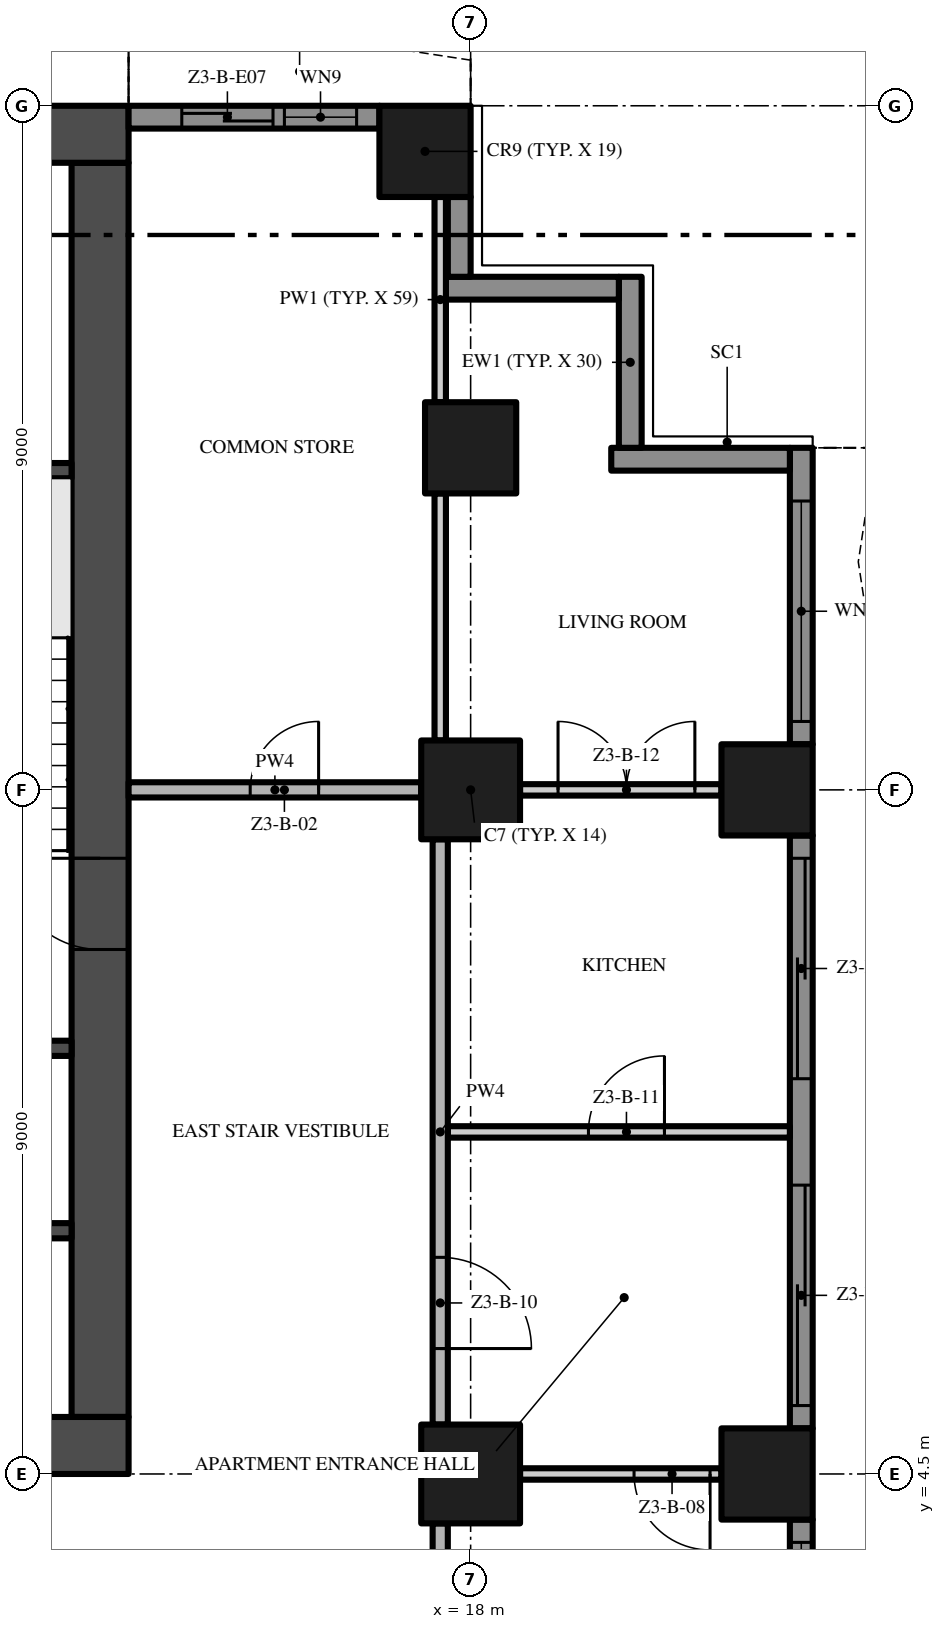
"""IFC4 building model, lengths in metres.
Left out: names, types, materials, properties, quantities, classifications, styles, units other than length and angle.
Written with IfcOpenShell. Run it as: python <this file> out.ifc"""

import sys

from ifc_helpers import new_model, si_unit, direction, frame, frame_2d, origin, origin_2d, place, context, subcontext, project, spatial, polyline, rectangle, outline, extrude, element, fill, save


model = new_model("IFC4")
c1 = context("Model", 3, precision=1e-05, world=origin(), true_north=direction((0.0, 1.0)))
c2 = subcontext(c1, "Body", "Model", "MODEL_VIEW")
j1 = project(units=[si_unit("LENGTHUNIT", "METRE"), si_unit("PLANEANGLEUNIT", "RADIAN")], contexts=[c1])
p1 = place(None, origin())
s1 = spatial("IfcSite", under=j1, at=p1, CompositionType="ELEMENT")
p2 = place(p1, origin())
s2 = spatial("IfcBuilding", under=s1, at=p2, CompositionType="ELEMENT")
p3 = place(p2, frame((0.0, 0.0, 136.4)))
s3 = spatial("IfcBuildingStorey", under=s2, at=p3, CompositionType="ELEMENT", Elevation=136.4)
p4 = place(p3, frame((-13.5, 4.875, -0.3), z_axis=(0.0, 0.0, 1.0), x_axis=(1.0, 0.0, 0.0)))
e1 = element("IfcWall", 1, at=p4, inside=s3, PredefinedType="SHEAR", context=c2, shape_type="SweptSolid", body=[
    extrude(rectangle(XDim=27.0, YDim=0.75, at=frame_2d((13.5, 0.0))), origin(), (0.0, 0.0, 1.0), 3.8),
])
p5 = place(p4, frame((12.0, 0.0, 0.3)))
e2 = element("IfcOpeningElement", 2, at=p5, cuts=e1, PredefinedType="OPENING", context=c2, shape_type="SweptSolid", body=[
    extrude(rectangle(XDim=3.0, YDim=2.4, at=frame_2d((1.5, 1.2))), frame((0.0, 0.385, 0.0), z_axis=(0.0, -1.0, 0.0), x_axis=(1.0, 0.0, 0.0)), (0.0, 0.0, 1.0), 0.77),
])
p6 = place(p4, frame((4.9, 0.0, 0.3)))
e3 = element("IfcOpeningElement", 3, at=p6, cuts=e1, PredefinedType="OPENING", context=c2, shape_type="SweptSolid", body=[
    extrude(rectangle(XDim=1.2, YDim=2.2, at=frame_2d((0.6, 1.1))), frame((0.0, 0.385, 0.0), z_axis=(0.0, -1.0, 0.0), x_axis=(1.0, 0.0, 0.0)), (0.0, 0.0, 1.0), 0.77),
])
p7 = place(p4, frame((20.75, 0.0, 0.3)))
e4 = element("IfcOpeningElement", 4, at=p7, cuts=e1, PredefinedType="OPENING", context=c2, shape_type="SweptSolid", body=[
    extrude(rectangle(XDim=1.5, YDim=2.2, at=frame_2d((0.75, 1.1))), frame((0.0, 0.385, 0.0), z_axis=(0.0, -1.0, 0.0), x_axis=(1.0, 0.0, 0.0)), (0.0, 0.0, 1.0), 0.77),
])
p8 = place(p4, frame((17.4, 0.0, 0.3)))
e5 = element("IfcOpeningElement", 5, at=p8, cuts=e1, PredefinedType="OPENING", context=c2, shape_type="SweptSolid", body=[
    extrude(rectangle(XDim=1.2, YDim=2.2, at=frame_2d((0.6, 1.1))), frame((0.0, 0.385, 0.0), z_axis=(0.0, -1.0, 0.0), x_axis=(1.0, 0.0, 0.0)), (0.0, 0.0, 1.0), 0.77),
])
p9 = place(p3, frame((13.125, 5.25, -0.3), z_axis=(0.0, 0.0, 1.0), x_axis=(0.0, 1.0, 0.0)))
e6 = element("IfcWall", 6, at=p9, inside=s3, PredefinedType="SHEAR", context=c2, shape_type="SweptSolid", body=[
    extrude(rectangle(XDim=16.5, YDim=0.75, at=frame_2d((8.25, 0.0))), origin(), (0.0, 0.0, 1.0), 3.8),
])
p10 = place(p9, frame((6.15, 0.0, 0.3)))
e7 = element("IfcOpeningElement", 7, at=p10, cuts=e6, PredefinedType="OPENING", context=c2, shape_type="SweptSolid", body=[
    extrude(rectangle(XDim=1.2, YDim=2.2, at=frame_2d((0.6, 1.1))), frame((0.0, 0.385, 0.0), z_axis=(0.0, -1.0, 0.0), x_axis=(1.0, 0.0, 0.0)), (0.0, 0.0, 1.0), 0.77),
])
p11 = place(p3, frame((13.5, 22.125, -0.3), z_axis=(0.0, 0.0, 1.0), x_axis=(-1.0, 0.0, 0.0)))
e8 = element("IfcWall", 8, at=p11, inside=s3, PredefinedType="SHEAR", context=c2, shape_type="SweptSolid", body=[
    extrude(rectangle(XDim=27.0, YDim=0.75, at=frame_2d((13.5, 0.0))), origin(), (0.0, 0.0, 1.0), 3.8),
])
p12 = place(p3, frame((18.0, 13.5, 0.0), z_axis=(0.0, 0.0, 1.0), x_axis=(1.0, 0.0, 0.0)))
e9 = element("IfcColumn", 9, at=p12, inside=s3, PredefinedType="COLUMN", context=c2, shape_type="SweptSolid", body=[
    extrude(rectangle(XDim=1.3, YDim=1.3, at=origin_2d()), origin(), (0.0, 0.0, 1.0), 3.5),
])
p13 = place(p3, frame((17.4, 21.9, 0.0), z_axis=(0.0, 0.0, 1.0), x_axis=(1.0, 0.0, 0.0)))
e10 = element("IfcColumn", 10, at=p13, inside=s3, PredefinedType="COLUMN", context=c2, shape_type="SweptSolid", body=[
    extrude(rectangle(XDim=1.2, YDim=1.2, at=origin_2d()), origin(), (0.0, 0.0, 1.0), 3.5),
])
p14 = place(p3, frame((18.0, 4.5, 0.0), z_axis=(0.0, 0.0, 1.0), x_axis=(1.0, 0.0, 0.0)))
e11 = element("IfcColumn", 11, at=p14, inside=s3, PredefinedType="COLUMN", context=c2, shape_type="SweptSolid", body=[
    extrude(rectangle(XDim=1.3, YDim=1.3, at=origin_2d()), origin(), (0.0, 0.0, 1.0), 3.5),
])
for number, where, z_axis, x_axis in (
    (12, (21.9, 13.5, 0.0), (0.0, 0.0, 1.0), (1.0, 0.0, 0.0)),
    (13, (18.0, 18.0, 0.0), (0.0, 0.0, 1.0), (1.0, 0.0, 0.0)),
    (14, (21.9, 4.5, 0.0), (0.0, 0.0, 1.0), (1.0, 0.0, 0.0)),
):
    element("IfcColumn", number, at=place(p3, frame(where, z_axis=z_axis, x_axis=x_axis)), inside=s3, PredefinedType="COLUMN", context=c2, shape_type="SweptSolid", body=[
        extrude(rectangle(XDim=1.2, YDim=1.2, at=origin_2d()), origin(), (0.0, 0.0, 1.0), 3.5),
    ])
p15 = place(p3, frame((22.35, 3.9, 0.0), z_axis=(0.0, 0.0, 1.0), x_axis=(0.0, -1.0, 0.0)))
e15 = element("IfcWall", 15, at=p15, inside=s3, PredefinedType="SOLIDWALL", context=c2, shape_type="SweptSolid", body=[
    extrude(rectangle(XDim=7.8, YDim=0.3, at=frame_2d((3.9, 0.0))), origin(), (0.0, 0.0, 1.0), 3.5),
])
p16 = place(p15, frame((4.6, 0.0, 0.45)))
e16 = element("IfcOpeningElement", 16, at=p16, cuts=e15, PredefinedType="OPENING", context=c2, shape_type="SweptSolid", body=[
    extrude(rectangle(XDim=2.9, YDim=2.65, at=frame_2d((1.45, 1.325))), frame((0.0, 0.16, 0.0), z_axis=(0.0, -1.0, 0.0), x_axis=(1.0, 0.0, 0.0)), (0.0, 0.0, 1.0), 0.32),
])
p17 = place(p15, frame((0.3, 0.0, 0.45)))
e17 = element("IfcOpeningElement", 17, at=p17, cuts=e15, PredefinedType="OPENING", context=c2, shape_type="SweptSolid", body=[
    extrude(rectangle(XDim=2.9, YDim=2.65, at=frame_2d((1.45, 1.325))), frame((0.0, 0.16, 0.0), z_axis=(0.0, -1.0, 0.0), x_axis=(1.0, 0.0, 0.0)), (0.0, 0.0, 1.0), 0.32),
])
p18 = place(p3, frame((22.35, 12.9, 0.0), z_axis=(0.0, 0.0, 1.0), x_axis=(0.0, -1.0, 0.0)))
e18 = element("IfcWall", 18, at=p18, inside=s3, PredefinedType="SOLIDWALL", context=c2, shape_type="SweptSolid", body=[
    extrude(rectangle(XDim=7.8, YDim=0.3, at=frame_2d((3.9, 0.0))), origin(), (0.0, 0.0, 1.0), 3.5),
])
p19 = place(p18, frame((4.6, 0.0, 0.0)))
e19 = element("IfcOpeningElement", 19, at=p19, cuts=e18, PredefinedType="OPENING", context=c2, shape_type="SweptSolid", body=[
    extrude(rectangle(XDim=2.9, YDim=2.4, at=frame_2d((1.45, 1.2))), frame((0.0, 0.16, 0.0), z_axis=(0.0, -1.0, 0.0), x_axis=(1.0, 0.0, 0.0)), (0.0, 0.0, 1.0), 0.32),
])
p20 = place(p18, frame((0.3, 0.0, 0.0)))
e20 = element("IfcOpeningElement", 20, at=p20, cuts=e18, PredefinedType="OPENING", context=c2, shape_type="SweptSolid", body=[
    extrude(rectangle(XDim=2.9, YDim=2.4, at=frame_2d((1.45, 1.2))), frame((0.0, 0.16, 0.0), z_axis=(0.0, -1.0, 0.0), x_axis=(1.0, 0.0, 0.0)), (0.0, 0.0, 1.0), 0.32),
])
p21 = place(p3, frame((22.35, 18.0, 0.0), z_axis=(0.0, 0.0, 1.0), x_axis=(0.0, -1.0, 0.0)))
e21 = element("IfcWall", 21, at=p21, inside=s3, PredefinedType="SOLIDWALL", context=c2, shape_type="SweptSolid", body=[
    extrude(rectangle(XDim=3.9, YDim=0.3, at=frame_2d((1.95, 0.0))), origin(), (0.0, 0.0, 1.0), 3.5),
])
p22 = place(p21, frame((0.7, 0.0, 0.45)))
e22 = element("IfcOpeningElement", 22, at=p22, cuts=e21, PredefinedType="OPENING", context=c2, shape_type="SweptSolid", body=[
    extrude(rectangle(XDim=2.9, YDim=2.65, at=frame_2d((1.45, 1.325))), frame((0.0, 0.16, 0.0), z_axis=(0.0, -1.0, 0.0), x_axis=(1.0, 0.0, 0.0)), (0.0, 0.0, 1.0), 0.32),
])
p23 = place(p3, frame((19.85, 17.85, 0.0), z_axis=(0.0, 0.0, 1.0), x_axis=(1.0, 0.0, 0.0)))
e23 = element("IfcWall", 23, at=p23, inside=s3, PredefinedType="SOLIDWALL", context=c2, shape_type="SweptSolid", body=[
    extrude(rectangle(XDim=2.35, YDim=0.3, at=frame_2d((1.175, 0.0))), origin(), (0.0, 0.0, 1.0), 3.5),
])
p24 = place(p3, frame((20.1, 20.25, 0.0), z_axis=(0.0, 0.0, 1.0), x_axis=(0.0, -1.0, 0.0)))
e24 = element("IfcWall", 24, at=p24, inside=s3, PredefinedType="SOLIDWALL", context=c2, shape_type="SweptSolid", body=[
    extrude(rectangle(XDim=2.25, YDim=0.3, at=frame_2d((1.125, 0.0))), origin(), (0.0, 0.0, 1.0), 3.5),
])
p25 = place(p3, frame((17.6, 20.1, 0.0), z_axis=(0.0, 0.0, 1.0), x_axis=(1.0, 0.0, 0.0)))
e25 = element("IfcWall", 25, at=p25, inside=s3, PredefinedType="SOLIDWALL", context=c2, shape_type="SweptSolid", body=[
    extrude(rectangle(XDim=2.35, YDim=0.3, at=frame_2d((1.175, 0.0))), origin(), (0.0, 0.0, 1.0), 3.5),
])
p26 = place(p3, frame((17.85, 21.3, 0.0), z_axis=(0.0, 0.0, 1.0), x_axis=(0.0, -1.0, 0.0)))
e26 = element("IfcWall", 26, at=p26, inside=s3, PredefinedType="SOLIDWALL", context=c2, shape_type="SweptSolid", body=[
    extrude(rectangle(XDim=1.05, YDim=0.3, at=frame_2d((0.525, 0.0))), origin(), (0.0, 0.0, 1.0), 3.5),
])
p27 = place(p3, frame((13.5, 22.35, 0.0), z_axis=(0.0, 0.0, 1.0), x_axis=(1.0, 0.0, 0.0)))
e27 = element("IfcWall", 27, at=p27, inside=s3, PredefinedType="SOLIDWALL", context=c2, shape_type="SweptSolid", body=[
    extrude(rectangle(XDim=3.3, YDim=0.3, at=frame_2d((1.65, 0.0))), origin(), (0.0, 0.0, 1.0), 3.5),
])
p28 = place(p27, frame((2.05, 0.0, 0.45)))
e28 = element("IfcOpeningElement", 28, at=p28, cuts=e27, PredefinedType="OPENING", context=c2, shape_type="SweptSolid", body=[
    extrude(rectangle(XDim=0.95, YDim=2.65, at=frame_2d((0.475, 1.325))), frame((0.0, 0.16, 0.0), z_axis=(0.0, -1.0, 0.0), x_axis=(1.0, 0.0, 0.0)), (0.0, 0.0, 1.0), 0.32),
])
p29 = place(p27, frame((0.7, 0.0, 0.0)))
e29 = element("IfcOpeningElement", 29, at=p29, cuts=e27, PredefinedType="OPENING", context=c2, shape_type="SweptSolid", body=[
    extrude(rectangle(XDim=1.2, YDim=2.4, at=frame_2d((0.6, 1.2))), frame((0.0, 0.16, 0.0), z_axis=(0.0, -1.0, 0.0), x_axis=(1.0, 0.0, 0.0)), (0.0, 0.0, 1.0), 0.32),
])
p30 = place(p3, origin())
e30 = element("IfcWall", 30, at=p30, inside=s3, PredefinedType="USERDEFINED", context=c2, shape_type="SweptSolid", body=[
    extrude(outline(polyline([(23.1, -13.5), (23.329, -12.0), (23.929, -10.5), (24.671, -9.0), (25.271, -7.5), (25.5, -6.0), (25.271, -4.5), (24.671, -3.0), (23.929, -1.5), (23.329, 0.0), (23.1, 1.5), (23.329, 3.0), (23.929, 4.5), (24.671, 6.0), (25.271, 7.5), (25.5, 9.0), (25.271, 10.5), (24.671, 12.0), (23.929, 13.5), (23.329, 15.0), (23.1, 16.5), (23.329, 18.0), (23.082, 18.038), (22.847, 16.5), (23.086, 14.934), (23.701, 13.398), (24.442, 11.898), (25.028, 10.434), (25.247, 9.0), (25.028, 7.566), (24.442, 6.102), (23.701, 4.602), (23.086, 3.066), (22.847, 1.5), (23.086, -0.066), (23.701, -1.602), (24.442, -3.102), (25.028, -4.566), (25.247, -6.0), (25.028, -7.434), (24.442, -8.898), (23.701, -10.398), (23.086, -11.934), (22.853, -13.462), (23.1, -13.5)])), origin(), (0.0, 0.0, 1.0), 0.9),
])
p31 = place(p3, origin())
e31 = element("IfcWall", 31, at=p31, inside=s3, PredefinedType="USERDEFINED", context=c2, shape_type="SweptSolid", body=[
    extrude(outline(polyline([(18.0, 23.1), (16.5, 23.329), (15.0, 23.929), (13.5, 24.671), (13.389, 24.447), (14.898, 23.701), (16.434, 23.086), (17.962, 22.853), (18.0, 23.1)])), origin(), (0.0, 0.0, 1.0), 0.9),
])
for number, where, z_axis, x_axis in (
    (32, (9.65, 7.7, 0.0), (0.0, 0.0, 1.0), (1.0, 0.0, 0.0)),
    (33, (9.65, 10.1, 0.0), (0.0, 0.0, 1.0), (1.0, 0.0, 0.0)),
    (34, (9.65, 17.7, 0.0), (0.0, 0.0, 1.0), (1.0, 0.0, 0.0)),
):
    element("IfcWall", number, at=place(p3, frame(where, z_axis=z_axis, x_axis=x_axis)), inside=s3, PredefinedType="SHEAR", context=c2, shape_type="SweptSolid", body=[
        extrude(rectangle(XDim=3.1, YDim=0.2, at=frame_2d((1.55, 0.0))), origin(), (0.0, 0.0, 1.0), 3.5),
    ])
p32 = place(p3, frame((21.3, 4.5, 0.0), z_axis=(0.0, 0.0, 1.0), x_axis=(-1.0, 0.0, 0.0)))
e35 = element("IfcWall", 35, at=p32, inside=s3, PredefinedType="PARTITIONING", context=c2, shape_type="SweptSolid", body=[
    extrude(rectangle(XDim=2.65, YDim=0.15, at=frame_2d((1.325, 0.0))), origin(), (0.0, 0.0, 1.0), 3.5),
])
p33 = place(p32, frame((0.15, 0.0, 0.0)))
e36 = element("IfcOpeningElement", 36, at=p33, cuts=e35, PredefinedType="OPENING", context=c2, shape_type="SweptSolid", body=[
    extrude(rectangle(XDim=1.0, YDim=2.4, at=frame_2d((0.5, 1.2))), frame((0.0, 0.085, 0.0), z_axis=(0.0, -1.0, 0.0), x_axis=(1.0, 0.0, 0.0)), (0.0, 0.0, 1.0), 0.17),
])
p34 = place(p3, frame((17.7, 9.0, 0.0), z_axis=(0.0, 0.0, 1.0), x_axis=(1.0, 0.0, 0.0)))
e37 = element("IfcWall", 37, at=p34, inside=s3, PredefinedType="PARTITIONING", context=c2, shape_type="SweptSolid", body=[
    extrude(rectangle(XDim=4.5, YDim=0.15, at=frame_2d((2.25, 0.0))), origin(), (0.0, 0.0, 1.0), 3.5),
])
p35 = place(p34, frame((1.85, 0.0, 0.0)))
e38 = element("IfcOpeningElement", 38, at=p35, cuts=e37, PredefinedType="OPENING", context=c2, shape_type="SweptSolid", body=[
    extrude(rectangle(XDim=1.0, YDim=2.4, at=frame_2d((0.5, 1.2))), frame((0.0, 0.085, 0.0), z_axis=(0.0, -1.0, 0.0), x_axis=(1.0, 0.0, 0.0)), (0.0, 0.0, 1.0), 0.17),
])
p36 = place(p3, frame((13.5, 13.5, 0.0), z_axis=(0.0, 0.0, 1.0), x_axis=(1.0, 0.0, 0.0)))
e39 = element("IfcWall", 39, at=p36, inside=s3, PredefinedType="PARTITIONING", context=c2, shape_type="SweptSolid", body=[
    extrude(rectangle(XDim=3.85, YDim=0.2, at=frame_2d((1.925, 0.0))), origin(), (0.0, 0.0, 1.0), 3.5),
])
p37 = place(p36, frame((1.6, 0.0, 0.0)))
e40 = element("IfcOpeningElement", 40, at=p37, cuts=e39, PredefinedType="OPENING", context=c2, shape_type="SweptSolid", body=[
    extrude(rectangle(XDim=0.9, YDim=2.1, at=frame_2d((0.45, 1.05))), frame((0.0, 0.11, 0.0), z_axis=(0.0, -1.0, 0.0), x_axis=(1.0, 0.0, 0.0)), (0.0, 0.0, 1.0), 0.22),
])
p38 = place(p3, frame((18.65, 13.5, 0.0), z_axis=(0.0, 0.0, 1.0), x_axis=(1.0, 0.0, 0.0)))
e41 = element("IfcWall", 41, at=p38, inside=s3, PredefinedType="PARTITIONING", context=c2, shape_type="SweptSolid", body=[
    extrude(rectangle(XDim=2.65, YDim=0.15, at=frame_2d((1.325, 0.0))), origin(), (0.0, 0.0, 1.0), 3.5),
])
p39 = place(p38, frame((0.5, 0.0, 0.0)))
e42 = element("IfcOpeningElement", 42, at=p39, cuts=e41, PredefinedType="OPENING", context=c2, shape_type="SweptSolid", body=[
    extrude(rectangle(XDim=1.8, YDim=2.4, at=frame_2d((0.9, 1.2))), frame((0.0, 0.085, 0.0), z_axis=(0.0, -1.0, 0.0), x_axis=(1.0, 0.0, 0.0)), (0.0, 0.0, 1.0), 0.17),
])
p40 = place(p3, frame((17.6, -0.2, 0.0), z_axis=(0.0, 0.0, 1.0), x_axis=(0.0, 1.0, 0.0)))
e43 = element("IfcWall", 43, at=p40, inside=s3, PredefinedType="PARTITIONING", context=c2, shape_type="SweptSolid", body=[
    extrude(rectangle(XDim=4.05, YDim=0.2, at=frame_2d((2.025, 0.0))), origin(), (0.0, 0.0, 1.0), 3.5),
])
p41 = place(p3, frame((17.6, 12.85, 0.0), z_axis=(0.0, 0.0, 1.0), x_axis=(0.0, -1.0, 0.0)))
e44 = element("IfcWall", 44, at=p41, inside=s3, PredefinedType="PARTITIONING", context=c2, shape_type="SweptSolid", body=[
    extrude(rectangle(XDim=7.7, YDim=0.2, at=frame_2d((3.85, 0.0))), origin(), (0.0, 0.0, 1.0), 3.5),
])
p42 = place(p41, frame((5.5, 0.0, 0.0)))
e45 = element("IfcOpeningElement", 45, at=p42, cuts=e44, PredefinedType="OPENING", context=c2, shape_type="SweptSolid", body=[
    extrude(rectangle(XDim=1.2, YDim=2.4, at=frame_2d((0.6, 1.2))), frame((0.0, 0.11, 0.0), z_axis=(0.0, -1.0, 0.0), x_axis=(1.0, 0.0, 0.0)), (0.0, 0.0, 1.0), 0.22),
])
p43 = place(p3, frame((17.6, 14.15, 0.0), z_axis=(0.0, 0.0, 1.0), x_axis=(0.0, 1.0, 0.0)))
e46 = element("IfcWall", 46, at=p43, inside=s3, PredefinedType="PARTITIONING", context=c2, shape_type="SweptSolid", body=[
    extrude(rectangle(XDim=3.25, YDim=0.15, at=frame_2d((1.625, 0.0))), origin(), (0.0, 0.0, 1.0), 3.5),
])
p44 = place(p3, frame((17.6, 18.6, 0.0), z_axis=(0.0, 0.0, 1.0), x_axis=(0.0, 1.0, 0.0)))
e47 = element("IfcWall", 47, at=p44, inside=s3, PredefinedType="PARTITIONING", context=c2, shape_type="SweptSolid", body=[
    extrude(rectangle(XDim=2.7, YDim=0.15, at=frame_2d((1.35, 0.0))), origin(), (0.0, 0.0, 1.0), 3.5),
])
p45 = place(p17, origin())
e48 = element("IfcWindow", 48, at=p45, inside=s3, PartitioningType="SINGLE_PANEL", PredefinedType="WINDOW", context=c2, shape_type="SweptSolid", body=[
    extrude(rectangle(XDim=2.9, YDim=2.65, at=frame_2d((1.45, 1.325))), frame((0.0, 0.03, 0.0), z_axis=(0.0, -1.0, 0.0), x_axis=(1.0, 0.0, 0.0)), (0.0, 0.0, 1.0), 0.06),
])
fill(e17, e48)
p46 = place(p19, origin())
e49 = element("IfcDoor", 49, at=p46, inside=s3, OperationType="SINGLE_SWING_LEFT", PredefinedType="DOOR", context=c2, shape_type="SweptSolid", body=[
    extrude(rectangle(XDim=2.9, YDim=2.4, at=frame_2d((1.45, 1.2))), frame((0.0, 0.025, 0.0), z_axis=(0.0, -1.0, 0.0), x_axis=(1.0, 0.0, 0.0)), (0.0, 0.0, 1.0), 0.05),
])
fill(e19, e49)
p47 = place(p20, origin())
e50 = element("IfcDoor", 50, at=p47, inside=s3, OperationType="SINGLE_SWING_LEFT", PredefinedType="DOOR", context=c2, shape_type="SweptSolid", body=[
    extrude(rectangle(XDim=2.9, YDim=2.4, at=frame_2d((1.45, 1.2))), frame((0.0, 0.025, 0.0), z_axis=(0.0, -1.0, 0.0), x_axis=(1.0, 0.0, 0.0)), (0.0, 0.0, 1.0), 0.05),
])
fill(e20, e50)
p48 = place(p22, origin())
e51 = element("IfcWindow", 51, at=p48, inside=s3, PartitioningType="SINGLE_PANEL", PredefinedType="WINDOW", context=c2, shape_type="SweptSolid", body=[
    extrude(rectangle(XDim=2.9, YDim=2.65, at=frame_2d((1.45, 1.325))), frame((0.0, 0.03, 0.0), z_axis=(0.0, -1.0, 0.0), x_axis=(1.0, 0.0, 0.0)), (0.0, 0.0, 1.0), 0.06),
])
fill(e22, e51)
p49 = place(p28, origin())
e52 = element("IfcWindow", 52, at=p49, inside=s3, PartitioningType="SINGLE_PANEL", PredefinedType="WINDOW", context=c2, shape_type="SweptSolid", body=[
    extrude(rectangle(XDim=0.95, YDim=2.65, at=frame_2d((0.475, 1.325))), frame((0.0, 0.03, 0.0), z_axis=(0.0, -1.0, 0.0), x_axis=(1.0, 0.0, 0.0)), (0.0, 0.0, 1.0), 0.06),
])
fill(e28, e52)
p50 = place(p29, origin())
e53 = element("IfcDoor", 53, at=p50, inside=s3, OperationType="SINGLE_SWING_LEFT", PredefinedType="DOOR", context=c2, shape_type="SweptSolid", body=[
    extrude(rectangle(XDim=1.2, YDim=2.4, at=frame_2d((0.6, 1.2))), frame((0.0, 0.025, 0.0), z_axis=(0.0, -1.0, 0.0), x_axis=(1.0, 0.0, 0.0)), (0.0, 0.0, 1.0), 0.05),
])
fill(e29, e53)
p51 = place(p10, frame((1.2, 0.0, 0.0), z_axis=(0.0, 0.0, 1.0), x_axis=(-1.0, 0.0, 0.0)))
e54 = element("IfcDoor", 54, at=p51, inside=s3, OperationType="SINGLE_SWING_LEFT", PredefinedType="DOOR", context=c2, shape_type="SweptSolid", body=[
    extrude(rectangle(XDim=1.2, YDim=2.2, at=frame_2d((0.6, 1.1))), frame((0.0, 0.025, 0.0), z_axis=(0.0, -1.0, 0.0), x_axis=(1.0, 0.0, 0.0)), (0.0, 0.0, 1.0), 0.05),
])
fill(e7, e54)
p52 = place(p37, origin())
e55 = element("IfcDoor", 55, at=p52, inside=s3, OperationType="SINGLE_SWING_RIGHT", PredefinedType="DOOR", context=c2, shape_type="SweptSolid", body=[
    extrude(rectangle(XDim=0.9, YDim=2.1, at=frame_2d((0.45, 1.05))), frame((0.0, 0.025, 0.0), z_axis=(0.0, -1.0, 0.0), x_axis=(1.0, 0.0, 0.0)), (0.0, 0.0, 1.0), 0.05),
])
fill(e40, e55)
p53 = place(p33, origin())
e56 = element("IfcDoor", 56, at=p53, inside=s3, OperationType="SINGLE_SWING_LEFT", PredefinedType="DOOR", context=c2, shape_type="SweptSolid", body=[
    extrude(rectangle(XDim=1.0, YDim=2.4, at=frame_2d((0.5, 1.2))), frame((0.0, 0.025, 0.0), z_axis=(0.0, -1.0, 0.0), x_axis=(1.0, 0.0, 0.0)), (0.0, 0.0, 1.0), 0.05),
])
fill(e36, e56)
p54 = place(p42, origin())
e57 = element("IfcDoor", 57, at=p54, inside=s3, OperationType="SINGLE_SWING_RIGHT", PredefinedType="DOOR", context=c2, shape_type="SweptSolid", body=[
    extrude(rectangle(XDim=1.2, YDim=2.4, at=frame_2d((0.6, 1.2))), frame((0.0, 0.025, 0.0), z_axis=(0.0, -1.0, 0.0), x_axis=(1.0, 0.0, 0.0)), (0.0, 0.0, 1.0), 0.05),
])
fill(e45, e57)
p55 = place(p35, origin())
e58 = element("IfcDoor", 58, at=p55, inside=s3, OperationType="SINGLE_SWING_RIGHT", PredefinedType="DOOR", context=c2, shape_type="SweptSolid", body=[
    extrude(rectangle(XDim=1.0, YDim=2.4, at=frame_2d((0.5, 1.2))), frame((0.0, 0.025, 0.0), z_axis=(0.0, -1.0, 0.0), x_axis=(1.0, 0.0, 0.0)), (0.0, 0.0, 1.0), 0.05),
])
fill(e38, e58)
p56 = place(p39, origin())
e59 = element("IfcDoor", 59, at=p56, inside=s3, OperationType="DOUBLE_DOOR_SINGLE_SWING", PredefinedType="DOOR", context=c2, shape_type="SweptSolid", body=[
    extrude(rectangle(XDim=1.8, YDim=2.4, at=frame_2d((0.9, 1.2))), frame((0.0, 0.025, 0.0), z_axis=(0.0, -1.0, 0.0), x_axis=(1.0, 0.0, 0.0)), (0.0, 0.0, 1.0), 0.05),
])
fill(e42, e59)
save(model, sys.argv[1])
